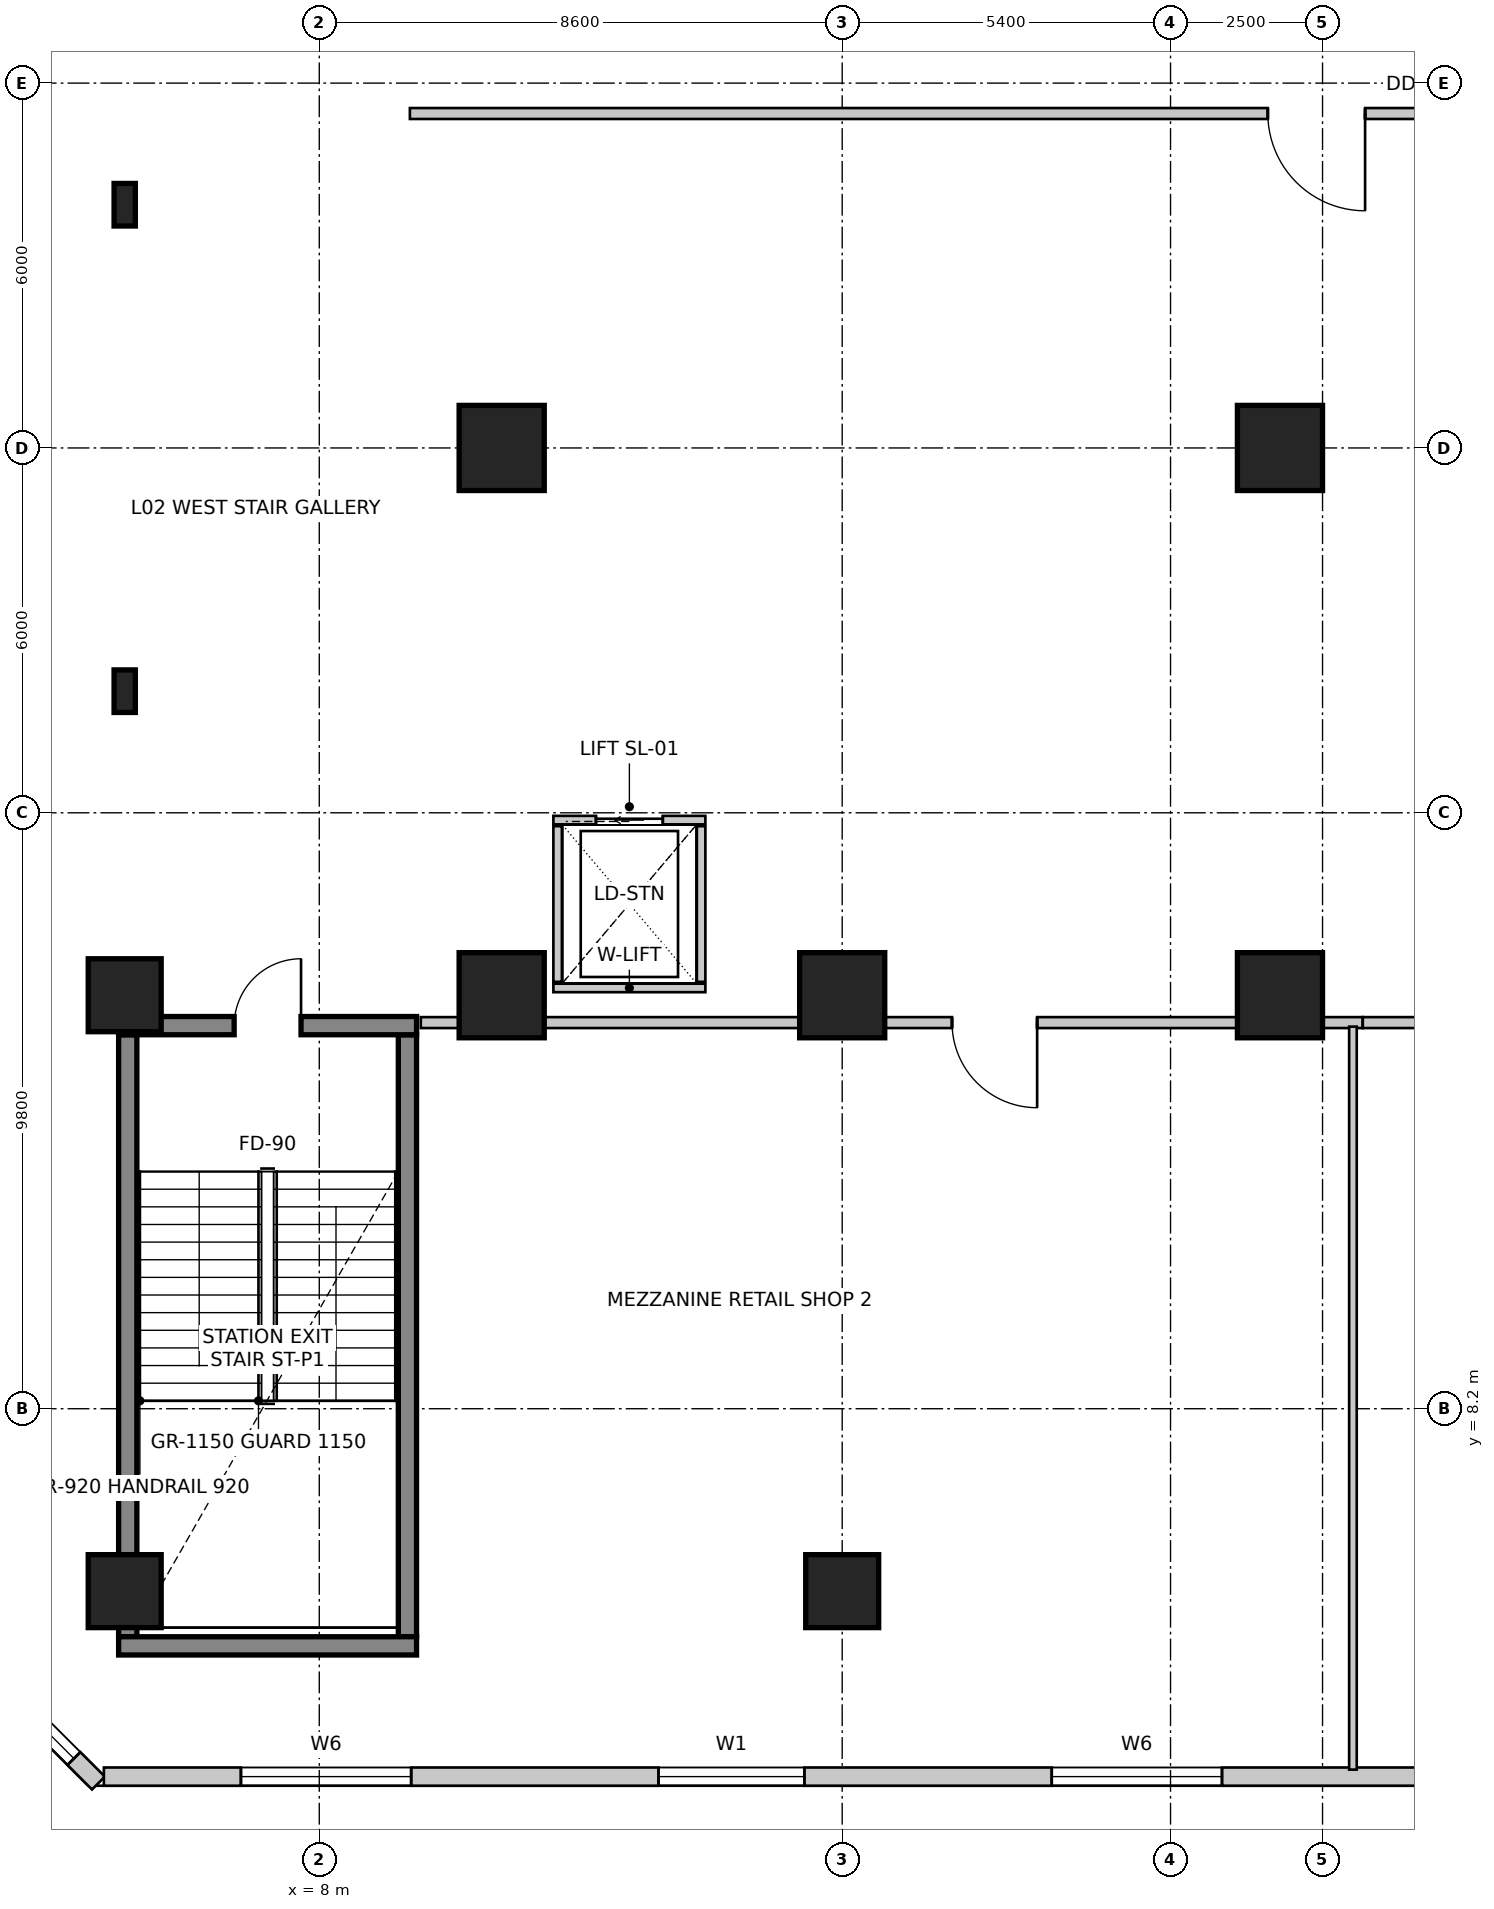
"""IFC4 building model, lengths in metres.
Left out: names, types, materials, properties, quantities, classifications, styles, units other than length and angle.
Written with IfcOpenShell. Run it as: python <this file> out.ifc"""

import sys

from ifc_helpers import new_model, si_unit, direction, frame, frame_2d, origin, origin_2d, place, context, subcontext, project, spatial, rectangle, extrude, source, transform, mapped, element, fill, save


model = new_model("IFC4")
c1 = context("Model", 3, precision=1e-05, world=origin(), true_north=direction((0.0, 1.0)))
c2 = subcontext(c1, "Body", "Model", "MODEL_VIEW")
j1 = project(units=[si_unit("LENGTHUNIT", "METRE"), si_unit("PLANEANGLEUNIT", "RADIAN")], contexts=[c1])
p1 = place(None, origin())
s1 = spatial("IfcSite", under=j1, at=p1, CompositionType="ELEMENT")
p2 = place(p1, origin())
s2 = spatial("IfcBuilding", under=s1, at=p2, CompositionType="ELEMENT")
p3 = place(p2, frame((0.0, 0.0, 6.0)))
s3 = spatial("IfcBuildingStorey", under=s2, at=p3, CompositionType="ELEMENT", Elevation=6.0)
for number, where, z_axis, x_axis in (
    (1, (4.85, 4.45, 0.0), (0.0, 0.0, 1.0), (0.0, 1.0, 0.0)),
    (2, (9.45, 4.45, 0.0), (0.0, 0.0, 1.0), (0.0, 1.0, 0.0)),
):
    element("IfcWall", number, at=place(p3, frame(where, z_axis=z_axis, x_axis=x_axis)), inside=s3, PredefinedType="SHEAR", context=c2, shape_type="SweptSolid", body=[
        extrude(rectangle(XDim=9.9, YDim=0.3, at=frame_2d((4.95, 0.0))), origin(), (0.0, 0.0, 1.0), 5.2),
    ])
p4 = place(p3, frame((4.7, 4.3, 0.0), z_axis=(0.0, 0.0, 1.0), x_axis=(1.0, 0.0, 0.0)))
e3 = element("IfcWall", 3, at=p4, inside=s3, PredefinedType="SHEAR", context=c2, shape_type="SweptSolid", body=[
    extrude(rectangle(XDim=4.9, YDim=0.3, at=frame_2d((2.45, 0.0))), origin(), (0.0, 0.0, 1.0), 5.2),
])
p5 = place(p3, frame((4.7, 14.5, 0.0), z_axis=(0.0, 0.0, 1.0), x_axis=(1.0, 0.0, 0.0)))
e4 = element("IfcWall", 4, at=p5, inside=s3, PredefinedType="SHEAR", context=c2, shape_type="SweptSolid", body=[
    extrude(rectangle(XDim=4.9, YDim=0.3, at=frame_2d((2.45, 0.0))), origin(), (0.0, 0.0, 1.0), 5.2),
])
m1 = source(origin(), c2, "Body", "SweptSolid", [
    extrude(rectangle(XDim=1.1, YDim=2.15, at=frame_2d((0.55, 1.075))), frame((0.0, 0.16, 0.0), z_axis=(0.0, -1.0, 0.0), x_axis=(1.0, 0.0, 0.0)), (0.0, 0.0, 1.0), 0.32),
])
p6 = place(p5, frame((1.9, 0.0, 0.0)))
e5 = element("IfcOpeningElement", 5, at=p6, cuts=e4, PredefinedType="OPENING", context=c2, shape_type="MappedRepresentation", body=[
    mapped(m1, transform((0.0, 0.0, 0.0), scale=1.0)),
])
m2 = source(origin(), c2, "Body", "SweptSolid", [
    extrude(rectangle(XDim=1.2, YDim=1.2, at=origin_2d()), origin(), (0.0, 0.0, 1.0), 5.2),
])
for number, where, z_axis, x_axis in (
    (6, (4.8, 5.2, 0.0), (0.0, 0.0, 1.0), (1.0, 0.0, 0.0)),
    (7, (16.6, 5.2, 0.0), (0.0, 0.0, 1.0), (1.0, 0.0, 0.0)),
    (8, (4.8, 15.0, 0.0), (0.0, 0.0, 1.0), (1.0, 0.0, 0.0)),
):
    element("IfcColumn", number, at=place(p3, frame(where, z_axis=z_axis, x_axis=x_axis)), inside=s3, PredefinedType="COLUMN", context=c2, shape_type="MappedRepresentation", body=[
        mapped(m2, transform((0.0, 0.0, 0.0), scale=1.0)),
    ])
m3 = source(origin(), c2, "Body", "SweptSolid", [
    extrude(rectangle(XDim=1.4, YDim=1.4, at=origin_2d()), origin(), (0.0, 0.0, 1.0), 5.2),
])
for number, where, z_axis, x_axis in (
    (9, (11.0, 15.0, 0.0), (0.0, 0.0, 1.0), (1.0, 0.0, 0.0)),
    (10, (16.6, 15.0, 0.0), (0.0, 0.0, 1.0), (1.0, 0.0, 0.0)),
    (11, (23.8, 15.0, 0.0), (0.0, 0.0, 1.0), (1.0, 0.0, 0.0)),
    (12, (11.0, 24.0, 0.0), (0.0, 0.0, 1.0), (1.0, 0.0, 0.0)),
    (13, (23.8, 24.0, 0.0), (0.0, 0.0, 1.0), (1.0, 0.0, 0.0)),
):
    element("IfcColumn", number, at=place(p3, frame(where, z_axis=z_axis, x_axis=x_axis)), inside=s3, PredefinedType="COLUMN", context=c2, shape_type="MappedRepresentation", body=[
        mapped(m3, transform((0.0, 0.0, 0.0), scale=1.0)),
    ])
m4 = source(origin(), c2, "Body", "SweptSolid", [
    extrude(rectangle(XDim=0.35, YDim=0.7, at=origin_2d()), origin(), (0.0, 0.0, 1.0), 5.2),
])
for number, where, z_axis, x_axis in (
    (14, (4.8, 20.0, 0.0), (0.0, 0.0, 1.0), (1.0, 0.0, 0.0)),
    (15, (4.8, 28.0, 0.0), (0.0, 0.0, 1.0), (1.0, 0.0, 0.0)),
):
    element("IfcColumn", number, at=place(p3, frame(where, z_axis=z_axis, x_axis=x_axis)), inside=s3, PredefinedType="PILASTER", context=c2, shape_type="MappedRepresentation", body=[
        mapped(m4, transform((0.0, 0.0, 0.0), scale=1.0)),
    ])
p7 = place(p3, frame((2.288, 4.124, 0.0), z_axis=(0.0, 0.0, 1.0), x_axis=(0.707106781187, -0.707106781187, 0.0)))
e16 = element("IfcWall", 16, at=p7, inside=s3, PredefinedType="SOLIDWALL", context=c2, shape_type="SweptSolid", body=[
    extrude(rectangle(XDim=2.942, YDim=0.3, at=frame_2d((1.471, 0.0))), origin(), (0.0, 0.0, 1.0), 4.9),
])
m5 = source(origin(), c2, "Body", "SweptSolid", [
    extrude(rectangle(XDim=1.8, YDim=2.1, at=frame_2d((0.9, 1.05))), frame((0.0, 0.16, 0.0), z_axis=(0.0, -1.0, 0.0), x_axis=(1.0, 0.0, 0.0)), (0.0, 0.0, 1.0), 0.32),
])
p8 = place(p7, frame((0.571, 0.0, 0.85)))
e17 = element("IfcOpeningElement", 17, at=p8, cuts=e16, PredefinedType="OPENING", context=c2, shape_type="MappedRepresentation", body=[
    mapped(m5, transform((0.0, 0.0, 0.0), scale=1.0)),
])
p9 = place(p3, frame((4.457, 2.15, 0.0), z_axis=(0.0, 0.0, 1.0), x_axis=(1.0, 0.0, 0.0)))
e18 = element("IfcWall", 18, at=p9, inside=s3, PredefinedType="SOLIDWALL", context=c2, shape_type="SweptSolid", body=[
    extrude(rectangle(XDim=61.085, YDim=0.3, at=frame_2d((30.543, 0.0))), origin(), (0.0, 0.0, 1.0), 4.9),
])
m6 = source(origin(), c2, "Body", "SweptSolid", [
    extrude(rectangle(XDim=2.8, YDim=2.4, at=frame_2d((1.4, 1.2))), frame((0.0, 0.16, 0.0), z_axis=(0.0, -1.0, 0.0), x_axis=(1.0, 0.0, 0.0)), (0.0, 0.0, 1.0), 0.32),
])
p10 = place(p9, frame((2.254, 0.0, 0.85)))
e19 = element("IfcOpeningElement", 19, at=p10, cuts=e18, PredefinedType="OPENING", context=c2, shape_type="MappedRepresentation", body=[
    mapped(m6, transform((0.0, 0.0, 0.0), scale=1.0)),
])
m7 = source(origin(), c2, "Body", "SweptSolid", [
    extrude(rectangle(XDim=2.4, YDim=2.2, at=frame_2d((1.2, 1.1))), frame((0.0, 0.16, 0.0), z_axis=(0.0, -1.0, 0.0), x_axis=(1.0, 0.0, 0.0)), (0.0, 0.0, 1.0), 0.32),
])
p11 = place(p9, frame((9.121, 0.0, 0.85)))
e20 = element("IfcOpeningElement", 20, at=p11, cuts=e18, PredefinedType="OPENING", context=c2, shape_type="MappedRepresentation", body=[
    mapped(m7, transform((0.0, 0.0, 0.0), scale=1.0)),
])
p12 = place(p9, frame((15.589, 0.0, 0.85)))
e21 = element("IfcOpeningElement", 21, at=p12, cuts=e18, PredefinedType="OPENING", context=c2, shape_type="MappedRepresentation", body=[
    mapped(m6, transform((0.0, 0.0, 0.0), scale=1.0)),
])
p13 = place(p9, frame((26.03, 0.0, 0.85)))
e22 = element("IfcOpeningElement", 22, at=p13, cuts=e18, PredefinedType="OPENING", context=c2, shape_type="MappedRepresentation", body=[
    mapped(m6, transform((0.0, 0.0, 0.0), scale=1.0)),
])
p14 = place(p9, frame((39.564, 0.0, 0.85)))
e23 = element("IfcOpeningElement", 23, at=p14, cuts=e18, PredefinedType="OPENING", context=c2, shape_type="MappedRepresentation", body=[
    mapped(m7, transform((0.0, 0.0, 0.0), scale=1.0)),
])
p15 = place(p9, frame((52.698, 0.0, 0.85)))
e24 = element("IfcOpeningElement", 24, at=p15, cuts=e18, PredefinedType="OPENING", context=c2, shape_type="MappedRepresentation", body=[
    mapped(m6, transform((0.0, 0.0, 0.0), scale=1.0)),
])
p16 = place(p3, frame((11.85, 17.88, 0.0), z_axis=(0.0, 0.0, 1.0), x_axis=(1.0, 0.0, 0.0)))
e25 = element("IfcWall", 25, at=p16, inside=s3, PredefinedType="SOLIDWALL", context=c2, shape_type="SweptSolid", body=[
    extrude(rectangle(XDim=2.5, YDim=0.14, at=frame_2d((1.25, 0.0))), origin(), (0.0, 0.0, 1.0), 4.9),
])
m8 = source(origin(), c2, "Body", "SweptSolid", [
    extrude(rectangle(XDim=1.1, YDim=2.15, at=frame_2d((0.55, 1.075))), frame((0.0, 0.08, 0.0), z_axis=(0.0, -1.0, 0.0), x_axis=(1.0, 0.0, 0.0)), (0.0, 0.0, 1.0), 0.16),
])
p17 = place(p16, frame((0.7, 0.0, 0.0)))
e26 = element("IfcOpeningElement", 26, at=p17, cuts=e25, PredefinedType="OPENING", context=c2, shape_type="MappedRepresentation", body=[
    mapped(m8, transform((0.0, 0.0, 0.0), scale=1.0)),
])
p18 = place(p3, frame((11.85, 15.12, 0.0), z_axis=(0.0, 0.0, 1.0), x_axis=(1.0, 0.0, 0.0)))
e27 = element("IfcWall", 27, at=p18, inside=s3, PredefinedType="SOLIDWALL", context=c2, shape_type="SweptSolid", body=[
    extrude(rectangle(XDim=2.5, YDim=0.14, at=frame_2d((1.25, 0.0))), origin(), (0.0, 0.0, 1.0), 3.692),
])
for number, where, z_axis, x_axis in (
    (28, (11.92, 15.22, 0.0), (0.0, 0.0, 1.0), (0.0, 1.0, 0.0)),
    (29, (14.28, 15.22, 0.0), (0.0, 0.0, 1.0), (0.0, 1.0, 0.0)),
):
    element("IfcWall", number, at=place(p3, frame(where, z_axis=z_axis, x_axis=x_axis)), inside=s3, PredefinedType="SOLIDWALL", context=c2, shape_type="SweptSolid", body=[
        extrude(rectangle(XDim=2.56, YDim=0.14, at=frame_2d((1.28, 0.0))), origin(), (0.0, 0.0, 1.0), 3.692),
    ])
p19 = place(p3, frame((39.31, 29.5, 0.0), z_axis=(0.0, 0.0, 1.0), x_axis=(-1.0, 0.0, 0.0)))
e30 = element("IfcWall", 30, at=p19, inside=s3, PredefinedType="PARTITIONING", context=c2, shape_type="SweptSolid", body=[
    extrude(rectangle(XDim=29.82, YDim=0.18, at=frame_2d((14.91, 0.0))), origin(), (0.0, 0.0, 1.0), 4.03),
])
m9 = source(origin(), c2, "Body", "SweptSolid", [
    extrude(rectangle(XDim=1.6, YDim=2.15, at=frame_2d((0.8, 1.075))), frame((0.0, 0.1, 0.0), z_axis=(0.0, -1.0, 0.0), x_axis=(1.0, 0.0, 0.0)), (0.0, 0.0, 1.0), 0.2),
])
p20 = place(p19, frame((14.11, 0.0, 0.0)))
e31 = element("IfcOpeningElement", 31, at=p20, cuts=e30, PredefinedType="OPENING", context=c2, shape_type="MappedRepresentation", body=[
    mapped(m9, transform((0.0, 0.0, 0.0), scale=1.0)),
])
p21 = place(p3, frame((25.16, 14.55, 0.0), z_axis=(0.0, 0.0, 1.0), x_axis=(-1.0, 0.0, 0.0)))
e32 = element("IfcWall", 32, at=p21, inside=s3, PredefinedType="PARTITIONING", context=c2, shape_type="SweptSolid", body=[
    extrude(rectangle(XDim=15.49, YDim=0.18, at=frame_2d((7.745, 0.0))), origin(), (0.0, 0.0, 1.0), 3.942),
])
m10 = source(origin(), c2, "Body", "SweptSolid", [
    extrude(rectangle(XDim=1.4, YDim=2.15, at=frame_2d((0.7, 1.075))), frame((0.0, 0.1, 0.0), z_axis=(0.0, -1.0, 0.0), x_axis=(1.0, 0.0, 0.0)), (0.0, 0.0, 1.0), 0.2),
])
p22 = place(p21, frame((5.354, 0.0, 0.0)))
e33 = element("IfcOpeningElement", 33, at=p22, cuts=e32, PredefinedType="OPENING", context=c2, shape_type="MappedRepresentation", body=[
    mapped(m10, transform((0.0, 0.0, 0.0), scale=1.0)),
])
p23 = place(p3, frame((39.13, 14.55, 0.0), z_axis=(0.0, 0.0, 1.0), x_axis=(-1.0, 0.0, 0.0)))
e34 = element("IfcWall", 34, at=p23, inside=s3, PredefinedType="PARTITIONING", context=c2, shape_type="SweptSolid", body=[
    extrude(rectangle(XDim=13.968, YDim=0.18, at=frame_2d((6.984, 0.0))), origin(), (0.0, 0.0, 1.0), 4.485),
])
p24 = place(p23, frame((6.284, 0.0, 0.0)))
e35 = element("IfcOpeningElement", 35, at=p24, cuts=e34, PredefinedType="OPENING", context=c2, shape_type="MappedRepresentation", body=[
    mapped(m10, transform((0.0, 0.0, 0.0), scale=1.0)),
])
p25 = place(p3, frame((25.0, 14.483, 0.0), z_axis=(0.0, 0.0, 1.0), x_axis=(0.0, -1.0, 0.0)))
e36 = element("IfcWall", 36, at=p25, inside=s3, PredefinedType="PARTITIONING", context=c2, shape_type="SweptSolid", body=[
    extrude(rectangle(XDim=12.219, YDim=0.125, at=frame_2d((6.109, 0.0))), origin(), (0.0, 0.0, 1.0), 3.692),
])
m11 = source(origin(), c2, "Body", "SweptSolid", [
    extrude(rectangle(XDim=1.8, YDim=2.1, at=frame_2d((0.9, 1.05))), frame((0.0, -0.015, 0.0), z_axis=(0.0, -1.0, 0.0), x_axis=(1.0, 0.0, 0.0)), (0.0, 0.0, 1.0), 0.06),
])
p26 = place(p8, origin())
e37 = element("IfcWindow", 37, at=p26, inside=s3, PartitioningType="SINGLE_PANEL", PredefinedType="WINDOW", context=c2, shape_type="MappedRepresentation", body=[
    mapped(m11, transform((0.0, 0.0, 0.0), scale=1.0)),
])
fill(e17, e37)
m12 = source(origin(), c2, "Body", "SweptSolid", [
    extrude(rectangle(XDim=2.8, YDim=2.4, at=frame_2d((1.4, 1.2))), frame((0.0, -0.015, 0.0), z_axis=(0.0, -1.0, 0.0), x_axis=(1.0, 0.0, 0.0)), (0.0, 0.0, 1.0), 0.06),
])
p27 = place(p10, origin())
e38 = element("IfcWindow", 38, at=p27, inside=s3, PartitioningType="SINGLE_PANEL", PredefinedType="WINDOW", context=c2, shape_type="MappedRepresentation", body=[
    mapped(m12, transform((0.0, 0.0, 0.0), scale=1.0)),
])
fill(e19, e38)
m13 = source(origin(), c2, "Body", "SweptSolid", [
    extrude(rectangle(XDim=2.4, YDim=2.2, at=frame_2d((1.2, 1.1))), frame((0.0, -0.015, 0.0), z_axis=(0.0, -1.0, 0.0), x_axis=(1.0, 0.0, 0.0)), (0.0, 0.0, 1.0), 0.06),
])
p28 = place(p11, origin())
e39 = element("IfcWindow", 39, at=p28, inside=s3, PartitioningType="SINGLE_PANEL", PredefinedType="WINDOW", context=c2, shape_type="MappedRepresentation", body=[
    mapped(m13, transform((0.0, 0.0, 0.0), scale=1.0)),
])
fill(e20, e39)
p29 = place(p12, origin())
e40 = element("IfcWindow", 40, at=p29, inside=s3, PartitioningType="SINGLE_PANEL", PredefinedType="WINDOW", context=c2, shape_type="MappedRepresentation", body=[
    mapped(m12, transform((0.0, 0.0, 0.0), scale=1.0)),
])
fill(e21, e40)
m14 = source(origin(), c2, "Body", "SweptSolid", [
    extrude(rectangle(XDim=1.1, YDim=2.15, at=frame_2d((0.55, 1.075))), frame((0.0, 0.025, 0.0), z_axis=(0.0, -1.0, 0.0), x_axis=(1.0, 0.0, 0.0)), (0.0, 0.0, 1.0), 0.05),
])
p30 = place(p17, origin())
e41 = element("IfcDoor", 41, at=p30, inside=s3, OperationType="SLIDING_TO_LEFT", PredefinedType="DOOR", context=c2, shape_type="MappedRepresentation", body=[
    mapped(m14, transform((0.0, 0.0, 0.0), scale=1.0)),
])
fill(e26, e41)
m15 = source(origin(), c2, "Body", "SweptSolid", [
    extrude(rectangle(XDim=1.1, YDim=2.15, at=frame_2d((0.55, 1.075))), frame((0.0, 0.025, 0.0), z_axis=(0.0, -1.0, 0.0), x_axis=(1.0, 0.0, 0.0)), (0.0, 0.0, 1.0), 0.05),
])
p31 = place(p6, origin())
e42 = element("IfcDoor", 42, at=p31, inside=s3, OperationType="SINGLE_SWING_RIGHT", PredefinedType="DOOR", context=c2, shape_type="MappedRepresentation", body=[
    mapped(m15, transform((0.0, 0.0, 0.0), scale=1.0)),
])
fill(e5, e42)
m16 = source(origin(), c2, "Body", "SweptSolid", [
    extrude(rectangle(XDim=1.6, YDim=2.15, at=frame_2d((0.8, 1.075))), frame((0.0, 0.025, 0.0), z_axis=(0.0, -1.0, 0.0), x_axis=(1.0, 0.0, 0.0)), (0.0, 0.0, 1.0), 0.05),
])
p32 = place(p20, origin())
e43 = element("IfcDoor", 43, at=p32, inside=s3, OperationType="SINGLE_SWING_LEFT", PredefinedType="DOOR", context=c2, shape_type="MappedRepresentation", body=[
    mapped(m16, transform((0.0, 0.0, 0.0), scale=1.0)),
])
fill(e31, e43)
m17 = source(origin(), c2, "Body", "SweptSolid", [
    extrude(rectangle(XDim=1.4, YDim=2.15, at=frame_2d((0.7, 1.075))), frame((0.0, 0.025, 0.0), z_axis=(0.0, -1.0, 0.0), x_axis=(1.0, 0.0, 0.0)), (0.0, 0.0, 1.0), 0.05),
])
p33 = place(p22, origin())
e44 = element("IfcDoor", 44, at=p33, inside=s3, OperationType="SINGLE_SWING_LEFT", PredefinedType="DOOR", context=c2, shape_type="MappedRepresentation", body=[
    mapped(m17, transform((0.0, 0.0, 0.0), scale=1.0)),
])
fill(e33, e44)
save(model, sys.argv[1])
